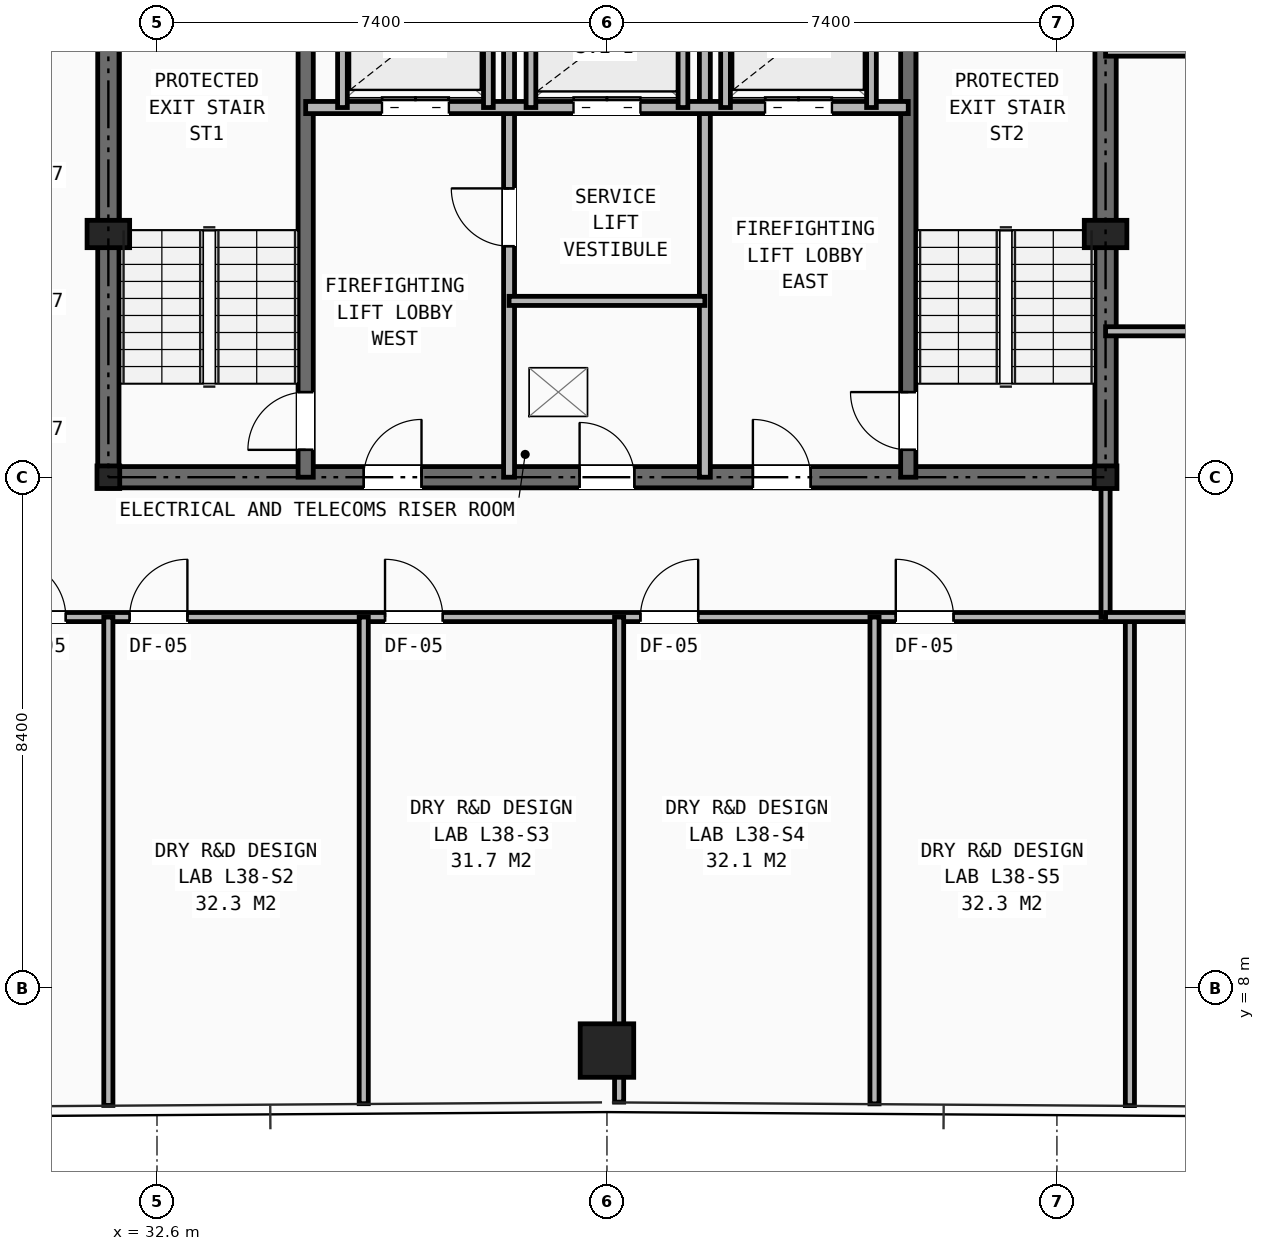
"""IFC4 building model, lengths in metres.
Left out: names, types, materials, properties, quantities, classifications, styles, units other than length and angle.
Written with IfcOpenShell. Run it as: python <this file> out.ifc"""

import sys

from ifc_helpers import new_model, si_unit, direction, frame, frame_2d, origin, origin_2d, place, context, subcontext, project, spatial, rectangle, hollow_rectangle, i_section, extrude, element, fill, save


model = new_model("IFC4")
c1 = context("Model", 3, precision=1e-05, world=origin(), true_north=direction((0.0, 1.0)))
c2 = subcontext(c1, "Body", "Model", "MODEL_VIEW")
j1 = project(units=[si_unit("LENGTHUNIT", "METRE"), si_unit("PLANEANGLEUNIT", "RADIAN")], contexts=[c1])
p1 = place(None, origin())
s1 = spatial("IfcSite", under=j1, at=p1, CompositionType="ELEMENT")
p2 = place(p1, origin())
s2 = spatial("IfcBuilding", under=s1, at=p2, CompositionType="ELEMENT")
p3 = place(p2, frame((0.0, 0.0, 133.25)))
s3 = spatial("IfcBuildingStorey", under=s2, at=p3, CompositionType="ELEMENT", Elevation=133.25)
for number, where, z_axis, x_axis in (
    (1, (31.8, 16.4, 0.0), (0.0, 0.0, 1.0), (1.0, 0.0, 0.0)),
    (2, (48.2, 16.4, 0.0), (0.0, 0.0, 1.0), (1.0, 0.0, 0.0)),
):
    element("IfcColumn", number, at=place(p3, frame(where, z_axis=z_axis, x_axis=x_axis)), inside=s3, PredefinedType="COLUMN", context=c2, shape_type="SweptSolid", body=[
        extrude(i_section(OverallWidth=0.374, OverallDepth=0.372, WebThickness=0.016, FlangeThickness=0.026, at=origin_2d()), origin(), (0.0, 0.0, 1.0), 3.45),
    ])
for number, where, z_axis, x_axis in (
    (3, (31.8, 20.4, 0.0), (0.0, 0.0, 1.0), (1.0, 0.0, 0.0)),
    (4, (48.2, 20.4, 0.0), (0.0, 0.0, 1.0), (1.0, 0.0, 0.0)),
):
    element("IfcColumn", number, at=place(p3, frame(where, z_axis=z_axis, x_axis=x_axis)), inside=s3, PredefinedType="PILASTER", context=c2, shape_type="SweptSolid", body=[
        extrude(rectangle(XDim=0.7, YDim=0.45, at=origin_2d()), origin(), (0.0, 0.0, 1.0), 3.45),
    ])
p4 = place(p3, frame((40.0, 6.97, 0.0), z_axis=(0.0, 0.0, 1.0), x_axis=(1.0, 0.0, 0.0)))
e5 = element("IfcColumn", 5, at=p4, inside=s3, PredefinedType="COLUMN", context=c2, shape_type="SweptSolid", body=[
    extrude(hollow_rectangle(XDim=0.88, YDim=0.88, WallThickness=0.06, at=origin_2d()), origin(), (0.0, 0.0, 1.0), 3.45),
])
p5 = place(p3, frame((31.8, 16.4, 0.0), z_axis=(0.0, 0.0, 1.0), x_axis=(1.0, 0.0, 0.0)))
e6 = element("IfcWall", 6, at=p5, inside=s3, PredefinedType="SHEAR", context=c2, shape_type="SweptSolid", body=[
    extrude(rectangle(XDim=16.4, YDim=0.35, at=frame_2d((8.2, 0.0))), origin(), (0.0, 0.0, 1.0), 3.21),
])
p6 = place(p5, frame((7.75, 0.0, 0.0)))
e7 = element("IfcOpeningElement", 7, at=p6, cuts=e6, PredefinedType="OPENING", context=c2, shape_type="SweptSolid", body=[
    extrude(rectangle(XDim=0.9, YDim=2.1, at=frame_2d((0.45, 1.05))), frame((0.0, 0.185, 0.0), z_axis=(0.0, -1.0, 0.0), x_axis=(1.0, 0.0, 0.0)), (0.0, 0.0, 1.0), 0.37),
])
p7 = place(p5, frame((4.2, 0.0, 0.0)))
e8 = element("IfcOpeningElement", 8, at=p7, cuts=e6, PredefinedType="OPENING", context=c2, shape_type="SweptSolid", body=[
    extrude(rectangle(XDim=0.95, YDim=2.1, at=frame_2d((0.475, 1.05))), frame((0.0, 0.185, 0.0), z_axis=(0.0, -1.0, 0.0), x_axis=(1.0, 0.0, 0.0)), (0.0, 0.0, 1.0), 0.37),
])
p8 = place(p5, frame((10.6, 0.0, 0.0)))
e9 = element("IfcOpeningElement", 9, at=p8, cuts=e6, PredefinedType="OPENING", context=c2, shape_type="SweptSolid", body=[
    extrude(rectangle(XDim=0.95, YDim=2.1, at=frame_2d((0.475, 1.05))), frame((0.0, 0.185, 0.0), z_axis=(0.0, -1.0, 0.0), x_axis=(1.0, 0.0, 0.0)), (0.0, 0.0, 1.0), 0.37),
])
p9 = place(p3, frame((31.8, 16.4, 0.0), z_axis=(0.0, 0.0, 1.0), x_axis=(0.0, 1.0, 0.0)))
e10 = element("IfcWall", 10, at=p9, inside=s3, PredefinedType="SHEAR", context=c2, shape_type="SweptSolid", body=[
    extrude(rectangle(XDim=14.8, YDim=0.35, at=frame_2d((7.4, 0.0))), origin(), (0.0, 0.0, 1.0), 3.21),
])
p10 = place(p9, frame((11.0, 0.0, 0.0)))
e11 = element("IfcOpeningElement", 11, at=p10, cuts=e10, PredefinedType="OPENING", context=c2, shape_type="SweptSolid", body=[
    extrude(rectangle(XDim=1.1, YDim=2.15, at=frame_2d((0.55, 1.075))), frame((0.0, 0.185, 0.0), z_axis=(0.0, -1.0, 0.0), x_axis=(1.0, 0.0, 0.0)), (0.0, 0.0, 1.0), 0.37),
])
p11 = place(p3, frame((48.2, 16.4, 0.0), z_axis=(0.0, 0.0, 1.0), x_axis=(0.0, 1.0, 0.0)))
e12 = element("IfcWall", 12, at=p11, inside=s3, PredefinedType="SHEAR", context=c2, shape_type="SweptSolid", body=[
    extrude(rectangle(XDim=14.8, YDim=0.35, at=frame_2d((7.4, 0.0))), origin(), (0.0, 0.0, 1.0), 3.21),
])
p12 = place(p11, frame((11.0, 0.0, 0.0)))
e13 = element("IfcOpeningElement", 13, at=p12, cuts=e12, PredefinedType="OPENING", context=c2, shape_type="SweptSolid", body=[
    extrude(rectangle(XDim=1.1, YDim=2.15, at=frame_2d((0.55, 1.075))), frame((0.0, 0.185, 0.0), z_axis=(0.0, -1.0, 0.0), x_axis=(1.0, 0.0, 0.0)), (0.0, 0.0, 1.0), 0.37),
])
p13 = place(p3, frame((35.045, 16.4, 0.0), z_axis=(0.0, 0.0, 1.0), x_axis=(0.0, 1.0, 0.0)))
e14 = element("IfcWall", 14, at=p13, inside=s3, PredefinedType="SHEAR", context=c2, shape_type="SweptSolid", body=[
    extrude(rectangle(XDim=8.4, YDim=0.25, at=frame_2d((4.2, 0.0))), origin(), (0.0, 0.0, 1.0), 3.21),
])
p14 = place(p13, frame((0.45, 0.0, 0.0)))
e15 = element("IfcOpeningElement", 15, at=p14, cuts=e14, PredefinedType="OPENING", context=c2, shape_type="SweptSolid", body=[
    extrude(rectangle(XDim=0.95, YDim=2.1, at=frame_2d((0.475, 1.05))), frame((0.0, 0.135, 0.0), z_axis=(0.0, -1.0, 0.0), x_axis=(1.0, 0.0, 0.0)), (0.0, 0.0, 1.0), 0.27),
])
p15 = place(p3, frame((44.955, 16.4, 0.0), z_axis=(0.0, 0.0, 1.0), x_axis=(0.0, 1.0, 0.0)))
e16 = element("IfcWall", 16, at=p15, inside=s3, PredefinedType="SHEAR", context=c2, shape_type="SweptSolid", body=[
    extrude(rectangle(XDim=8.4, YDim=0.25, at=frame_2d((4.2, 0.0))), origin(), (0.0, 0.0, 1.0), 3.21),
])
p16 = place(p15, frame((0.45, 0.0, 0.0)))
e17 = element("IfcOpeningElement", 17, at=p16, cuts=e16, PredefinedType="OPENING", context=c2, shape_type="SweptSolid", body=[
    extrude(rectangle(XDim=0.95, YDim=2.1, at=frame_2d((0.475, 1.05))), frame((0.0, 0.135, 0.0), z_axis=(0.0, -1.0, 0.0), x_axis=(1.0, 0.0, 0.0)), (0.0, 0.0, 1.0), 0.27),
])
p17 = place(p3, frame((38.39, 16.4, 0.0), z_axis=(0.0, 0.0, 1.0), x_axis=(0.0, 1.0, 0.0)))
e18 = element("IfcWall", 18, at=p17, inside=s3, PredefinedType="PARTITIONING", context=c2, shape_type="SweptSolid", body=[
    extrude(rectangle(XDim=8.4, YDim=0.18, at=frame_2d((4.2, 0.0))), origin(), (0.0, 0.0, 1.0), 2.661),
])
p18 = place(p17, frame((3.8, 0.0, 0.0)))
e19 = element("IfcOpeningElement", 19, at=p18, cuts=e18, PredefinedType="OPENING", context=c2, shape_type="SweptSolid", body=[
    extrude(rectangle(XDim=0.95, YDim=2.1, at=frame_2d((0.475, 1.05))), frame((0.0, 0.1, 0.0), z_axis=(0.0, -1.0, 0.0), x_axis=(1.0, 0.0, 0.0)), (0.0, 0.0, 1.0), 0.2),
])
p19 = place(p3, frame((41.61, 16.4, 0.0), z_axis=(0.0, 0.0, 1.0), x_axis=(0.0, 1.0, 0.0)))
e20 = element("IfcWall", 20, at=p19, inside=s3, PredefinedType="PARTITIONING", context=c2, shape_type="SweptSolid", body=[
    extrude(rectangle(XDim=8.4, YDim=0.18, at=frame_2d((4.2, 0.0))), origin(), (0.0, 0.0, 1.0), 2.661),
])
p20 = place(p3, frame((35.045, 22.48, 0.0), z_axis=(0.0, 0.0, 1.0), x_axis=(1.0, 0.0, 0.0)))
e21 = element("IfcWall", 21, at=p20, inside=s3, PredefinedType="SOLIDWALL", context=c2, shape_type="SweptSolid", body=[
    extrude(rectangle(XDim=9.91, YDim=0.2, at=frame_2d((4.955, 0.0))), origin(), (0.0, 0.0, 1.0), 3.21),
])
p21 = place(p20, frame((1.255, 0.0, 0.0)))
e22 = element("IfcOpeningElement", 22, at=p21, cuts=e21, PredefinedType="OPENING", context=c2, shape_type="SweptSolid", body=[
    extrude(rectangle(XDim=1.1, YDim=2.15, at=frame_2d((0.55, 1.075))), frame((0.0, 0.11, 0.0), z_axis=(0.0, -1.0, 0.0), x_axis=(1.0, 0.0, 0.0)), (0.0, 0.0, 1.0), 0.22),
])
p22 = place(p20, frame((7.555, 0.0, 0.0)))
e23 = element("IfcOpeningElement", 23, at=p22, cuts=e21, PredefinedType="OPENING", context=c2, shape_type="SweptSolid", body=[
    extrude(rectangle(XDim=1.1, YDim=2.15, at=frame_2d((0.55, 1.075))), frame((0.0, 0.11, 0.0), z_axis=(0.0, -1.0, 0.0), x_axis=(1.0, 0.0, 0.0)), (0.0, 0.0, 1.0), 0.22),
])
p23 = place(p20, frame((4.405, 0.0, 0.0)))
e24 = element("IfcOpeningElement", 24, at=p23, cuts=e21, PredefinedType="OPENING", context=c2, shape_type="SweptSolid", body=[
    extrude(rectangle(XDim=1.1, YDim=2.15, at=frame_2d((0.55, 1.075))), frame((0.0, 0.11, 0.0), z_axis=(0.0, -1.0, 0.0), x_axis=(1.0, 0.0, 0.0)), (0.0, 0.0, 1.0), 0.22),
])
p24 = place(p3, frame((38.39, 19.3, 0.0), z_axis=(0.0, 0.0, 1.0), x_axis=(1.0, 0.0, 0.0)))
e25 = element("IfcWall", 25, at=p24, inside=s3, PredefinedType="PARTITIONING", context=c2, shape_type="SweptSolid", body=[
    extrude(rectangle(XDim=3.22, YDim=0.15, at=frame_2d((1.61, 0.0))), origin(), (0.0, 0.0, 1.0), 3.21),
])
for number, where, z_axis, x_axis in (
    (26, (35.65, 22.48, 0.0), (0.0, 0.0, 1.0), (0.0, 1.0, 0.0)),
    (27, (38.05, 22.48, 0.0), (0.0, 0.0, 1.0), (0.0, 1.0, 0.0)),
    (28, (41.95, 22.48, 0.0), (0.0, 0.0, 1.0), (0.0, 1.0, 0.0)),
    (29, (44.35, 22.48, 0.0), (0.0, 0.0, 1.0), (0.0, 1.0, 0.0)),
    (30, (38.75, 22.48, 0.0), (0.0, 0.0, 1.0), (0.0, 1.0, 0.0)),
    (31, (41.25, 22.48, 0.0), (0.0, 0.0, 1.0), (0.0, 1.0, 0.0)),
):
    element("IfcWall", number, at=place(p3, frame(where, z_axis=z_axis, x_axis=x_axis)), inside=s3, PredefinedType="SOLIDWALL", context=c2, shape_type="SweptSolid", body=[
        extrude(rectangle(XDim=2.32, YDim=0.16, at=frame_2d((1.16, 0.0))), origin(), (0.0, 0.0, 1.0), 3.21),
    ])
p25 = place(p3, frame((29.6, 14.1, 0.0), z_axis=(0.0, 0.0, 1.0), x_axis=(1.0, 0.0, 0.0)))
e32 = element("IfcWall", 32, at=p25, inside=s3, PredefinedType="PARTITIONING", context=c2, shape_type="SweptSolid", body=[
    extrude(rectangle(XDim=18.6, YDim=0.15, at=frame_2d((9.3, 0.0))), origin(), (0.0, 0.0, 1.0), 2.252),
])
p26 = place(p25, frame((0.55, 0.0, 0.0)))
e33 = element("IfcOpeningElement", 33, at=p26, cuts=e32, PredefinedType="OPENING", context=c2, shape_type="SweptSolid", body=[
    extrude(rectangle(XDim=0.95, YDim=2.1, at=frame_2d((0.475, 1.05))), frame((0.0, 0.085, 0.0), z_axis=(0.0, -1.0, 0.0), x_axis=(1.0, 0.0, 0.0)), (0.0, 0.0, 1.0), 0.17),
])
p27 = place(p25, frame((2.55, 0.0, 0.0)))
e34 = element("IfcOpeningElement", 34, at=p27, cuts=e32, PredefinedType="OPENING", context=c2, shape_type="SweptSolid", body=[
    extrude(rectangle(XDim=0.95, YDim=2.1, at=frame_2d((0.475, 1.05))), frame((0.0, 0.085, 0.0), z_axis=(0.0, -1.0, 0.0), x_axis=(1.0, 0.0, 0.0)), (0.0, 0.0, 1.0), 0.17),
])
p28 = place(p25, frame((6.75, 0.0, 0.0)))
e35 = element("IfcOpeningElement", 35, at=p28, cuts=e32, PredefinedType="OPENING", context=c2, shape_type="SweptSolid", body=[
    extrude(rectangle(XDim=0.95, YDim=2.1, at=frame_2d((0.475, 1.05))), frame((0.0, 0.085, 0.0), z_axis=(0.0, -1.0, 0.0), x_axis=(1.0, 0.0, 0.0)), (0.0, 0.0, 1.0), 0.17),
])
p29 = place(p25, frame((10.95, 0.0, 0.0)))
e36 = element("IfcOpeningElement", 36, at=p29, cuts=e32, PredefinedType="OPENING", context=c2, shape_type="SweptSolid", body=[
    extrude(rectangle(XDim=0.95, YDim=2.1, at=frame_2d((0.475, 1.05))), frame((0.0, 0.085, 0.0), z_axis=(0.0, -1.0, 0.0), x_axis=(1.0, 0.0, 0.0)), (0.0, 0.0, 1.0), 0.17),
])
p30 = place(p25, frame((15.15, 0.0, 0.0)))
e37 = element("IfcOpeningElement", 37, at=p30, cuts=e32, PredefinedType="OPENING", context=c2, shape_type="SweptSolid", body=[
    extrude(rectangle(XDim=0.95, YDim=2.1, at=frame_2d((0.475, 1.05))), frame((0.0, 0.085, 0.0), z_axis=(0.0, -1.0, 0.0), x_axis=(1.0, 0.0, 0.0)), (0.0, 0.0, 1.0), 0.17),
])
p31 = place(p3, frame((48.2, 14.1, 0.0), z_axis=(0.0, 0.0, 1.0), x_axis=(0.0, 1.0, 0.0)))
e38 = element("IfcWall", 38, at=p31, inside=s3, PredefinedType="PARTITIONING", context=c2, shape_type="SweptSolid", body=[
    extrude(rectangle(XDim=2.3, YDim=0.15, at=frame_2d((1.15, 0.0))), origin(), (0.0, 0.0, 1.0), 2.661),
])
p32 = place(p3, frame((31.8, 6.068, 0.0), z_axis=(0.0, 0.0, 1.0), x_axis=(0.0, 1.0, 0.0)))
e39 = element("IfcWall", 39, at=p32, inside=s3, PredefinedType="PARTITIONING", context=c2, shape_type="SweptSolid", body=[
    extrude(rectangle(XDim=8.032, YDim=0.15, at=frame_2d((4.016, 0.0))), origin(), (0.0, 0.0, 1.0), 2.589),
])
p33 = place(p3, frame((36.0, 6.096, 0.0), z_axis=(0.0, 0.0, 1.0), x_axis=(0.0, 1.0, 0.0)))
e40 = element("IfcWall", 40, at=p33, inside=s3, PredefinedType="PARTITIONING", context=c2, shape_type="SweptSolid", body=[
    extrude(rectangle(XDim=8.004, YDim=0.15, at=frame_2d((4.002, 0.0))), origin(), (0.0, 0.0, 1.0), 2.252),
])
p34 = place(p3, frame((40.2, 6.122, 0.0), z_axis=(0.0, 0.0, 1.0), x_axis=(0.0, 1.0, 0.0)))
e41 = element("IfcWall", 41, at=p34, inside=s3, PredefinedType="PARTITIONING", context=c2, shape_type="SweptSolid", body=[
    extrude(rectangle(XDim=7.978, YDim=0.15, at=frame_2d((3.989, 0.0))), origin(), (0.0, 0.0, 1.0), 2.252),
])
p35 = place(p3, frame((44.4, 6.094, 0.0), z_axis=(0.0, 0.0, 1.0), x_axis=(0.0, 1.0, 0.0)))
e42 = element("IfcWall", 42, at=p35, inside=s3, PredefinedType="PARTITIONING", context=c2, shape_type="SweptSolid", body=[
    extrude(rectangle(XDim=8.007, YDim=0.15, at=frame_2d((4.003, 0.0))), origin(), (0.0, 0.0, 1.0), 2.589),
])
p36 = place(p3, frame((48.6, 6.065, 0.0), z_axis=(0.0, 0.0, 1.0), x_axis=(0.0, 1.0, 0.0)))
e43 = element("IfcWall", 43, at=p36, inside=s3, PredefinedType="PARTITIONING", context=c2, shape_type="SweptSolid", body=[
    extrude(rectangle(XDim=8.035, YDim=0.15, at=frame_2d((4.018, 0.0))), origin(), (0.0, 0.0, 1.0), 2.589),
])
p37 = place(p3, frame((48.2, 14.1, 0.0), z_axis=(0.0, 0.0, 1.0), x_axis=(1.0, 0.0, 0.0)))
e44 = element("IfcWall", 44, at=p37, inside=s3, PredefinedType="PARTITIONING", context=c2, shape_type="SweptSolid", body=[
    extrude(rectangle(XDim=18.678, YDim=0.15, at=frame_2d((9.339, 0.0))), origin(), (0.0, 0.0, 1.0), 2.589),
])
p38 = place(p3, frame((48.2, 18.8, 0.0), z_axis=(0.0, 0.0, 1.0), x_axis=(1.0, 0.0, 0.0)))
e45 = element("IfcWall", 45, at=p38, inside=s3, PredefinedType="PARTITIONING", context=c2, shape_type="SweptSolid", body=[
    extrude(rectangle(XDim=15.922, YDim=0.15, at=frame_2d((7.961, 0.0))), origin(), (0.0, 0.0, 1.0), 2.589),
])
p39 = place(p38, frame((1.4, 0.0, 0.0)))
e46 = element("IfcOpeningElement", 46, at=p39, cuts=e45, PredefinedType="OPENING", context=c2, shape_type="SweptSolid", body=[
    extrude(rectangle(XDim=0.95, YDim=2.1, at=frame_2d((0.475, 1.05))), frame((0.0, 0.085, 0.0), z_axis=(0.0, -1.0, 0.0), x_axis=(1.0, 0.0, 0.0)), (0.0, 0.0, 1.0), 0.17),
])
p40 = place(p3, frame((48.2, 23.4, 0.0), z_axis=(0.0, 0.0, 1.0), x_axis=(1.0, 0.0, 0.0)))
e47 = element("IfcWall", 47, at=p40, inside=s3, PredefinedType="PARTITIONING", context=c2, shape_type="SweptSolid", body=[
    extrude(rectangle(XDim=13.225, YDim=0.15, at=frame_2d((6.612, 0.0))), origin(), (0.0, 0.0, 1.0), 2.589),
])
p41 = place(p40, frame((1.4, 0.0, 0.0)))
e48 = element("IfcOpeningElement", 48, at=p41, cuts=e47, PredefinedType="OPENING", context=c2, shape_type="SweptSolid", body=[
    extrude(rectangle(XDim=0.95, YDim=2.1, at=frame_2d((0.475, 1.05))), frame((0.0, 0.085, 0.0), z_axis=(0.0, -1.0, 0.0), x_axis=(1.0, 0.0, 0.0)), (0.0, 0.0, 1.0), 0.17),
])
p42 = place(p6, origin())
e49 = element("IfcDoor", 49, at=p42, inside=s3, OperationType="SINGLE_SWING_LEFT", PredefinedType="DOOR", context=c2, shape_type="SweptSolid", body=[
    extrude(rectangle(XDim=0.9, YDim=2.1, at=frame_2d((0.45, 1.05))), frame((0.0, 0.025, 0.0), z_axis=(0.0, -1.0, 0.0), x_axis=(1.0, 0.0, 0.0)), (0.0, 0.0, 1.0), 0.05),
])
fill(e7, e49)
p43 = place(p18, origin())
e50 = element("IfcDoor", 50, at=p43, inside=s3, OperationType="SINGLE_SWING_RIGHT", PredefinedType="DOOR", context=c2, shape_type="SweptSolid", body=[
    extrude(rectangle(XDim=0.95, YDim=2.1, at=frame_2d((0.475, 1.05))), frame((0.0, 0.025, 0.0), z_axis=(0.0, -1.0, 0.0), x_axis=(1.0, 0.0, 0.0)), (0.0, 0.0, 1.0), 0.05),
])
fill(e19, e50)
p44 = place(p14, origin())
e51 = element("IfcDoor", 51, at=p44, inside=s3, OperationType="SINGLE_SWING_LEFT", PredefinedType="DOOR", context=c2, shape_type="SweptSolid", body=[
    extrude(rectangle(XDim=0.95, YDim=2.1, at=frame_2d((0.475, 1.05))), frame((0.0, 0.025, 0.0), z_axis=(0.0, -1.0, 0.0), x_axis=(1.0, 0.0, 0.0)), (0.0, 0.0, 1.0), 0.05),
])
fill(e15, e51)
p45 = place(p16, origin())
e52 = element("IfcDoor", 52, at=p45, inside=s3, OperationType="SINGLE_SWING_RIGHT", PredefinedType="DOOR", context=c2, shape_type="SweptSolid", body=[
    extrude(rectangle(XDim=0.95, YDim=2.1, at=frame_2d((0.475, 1.05))), frame((0.0, 0.025, 0.0), z_axis=(0.0, -1.0, 0.0), x_axis=(1.0, 0.0, 0.0)), (0.0, 0.0, 1.0), 0.05),
])
fill(e17, e52)
p46 = place(p7, origin())
e53 = element("IfcDoor", 53, at=p46, inside=s3, OperationType="SINGLE_SWING_RIGHT", PredefinedType="DOOR", context=c2, shape_type="SweptSolid", body=[
    extrude(rectangle(XDim=0.95, YDim=2.1, at=frame_2d((0.475, 1.05))), frame((0.0, 0.025, 0.0), z_axis=(0.0, -1.0, 0.0), x_axis=(1.0, 0.0, 0.0)), (0.0, 0.0, 1.0), 0.05),
])
fill(e8, e53)
p47 = place(p8, origin())
e54 = element("IfcDoor", 54, at=p47, inside=s3, OperationType="SINGLE_SWING_LEFT", PredefinedType="DOOR", context=c2, shape_type="SweptSolid", body=[
    extrude(rectangle(XDim=0.95, YDim=2.1, at=frame_2d((0.475, 1.05))), frame((0.0, 0.025, 0.0), z_axis=(0.0, -1.0, 0.0), x_axis=(1.0, 0.0, 0.0)), (0.0, 0.0, 1.0), 0.05),
])
fill(e9, e54)
p48 = place(p21, origin())
e55 = element("IfcDoor", 55, at=p48, inside=s3, OperationType="DOUBLE_DOOR_SLIDING", PredefinedType="DOOR", context=c2, shape_type="SweptSolid", body=[
    extrude(rectangle(XDim=1.1, YDim=2.15, at=frame_2d((0.55, 1.075))), frame((0.0, 0.025, 0.0), z_axis=(0.0, -1.0, 0.0), x_axis=(1.0, 0.0, 0.0)), (0.0, 0.0, 1.0), 0.05),
])
fill(e22, e55)
p49 = place(p22, origin())
e56 = element("IfcDoor", 56, at=p49, inside=s3, OperationType="DOUBLE_DOOR_SLIDING", PredefinedType="DOOR", context=c2, shape_type="SweptSolid", body=[
    extrude(rectangle(XDim=1.1, YDim=2.15, at=frame_2d((0.55, 1.075))), frame((0.0, 0.025, 0.0), z_axis=(0.0, -1.0, 0.0), x_axis=(1.0, 0.0, 0.0)), (0.0, 0.0, 1.0), 0.05),
])
fill(e23, e56)
p50 = place(p23, origin())
e57 = element("IfcDoor", 57, at=p50, inside=s3, OperationType="DOUBLE_DOOR_SLIDING", PredefinedType="DOOR", context=c2, shape_type="SweptSolid", body=[
    extrude(rectangle(XDim=1.1, YDim=2.15, at=frame_2d((0.55, 1.075))), frame((0.0, 0.025, 0.0), z_axis=(0.0, -1.0, 0.0), x_axis=(1.0, 0.0, 0.0)), (0.0, 0.0, 1.0), 0.05),
])
fill(e24, e57)
p51 = place(p26, origin())
e58 = element("IfcDoor", 58, at=p51, inside=s3, OperationType="SINGLE_SWING_LEFT", PredefinedType="DOOR", context=c2, shape_type="SweptSolid", body=[
    extrude(rectangle(XDim=0.95, YDim=2.1, at=frame_2d((0.475, 1.05))), frame((0.0, 0.025, 0.0), z_axis=(0.0, -1.0, 0.0), x_axis=(1.0, 0.0, 0.0)), (0.0, 0.0, 1.0), 0.05),
])
fill(e33, e58)
p52 = place(p27, origin())
e59 = element("IfcDoor", 59, at=p52, inside=s3, OperationType="SINGLE_SWING_RIGHT", PredefinedType="DOOR", context=c2, shape_type="SweptSolid", body=[
    extrude(rectangle(XDim=0.95, YDim=2.1, at=frame_2d((0.475, 1.05))), frame((0.0, 0.025, 0.0), z_axis=(0.0, -1.0, 0.0), x_axis=(1.0, 0.0, 0.0)), (0.0, 0.0, 1.0), 0.05),
])
fill(e34, e59)
p53 = place(p28, origin())
e60 = element("IfcDoor", 60, at=p53, inside=s3, OperationType="SINGLE_SWING_LEFT", PredefinedType="DOOR", context=c2, shape_type="SweptSolid", body=[
    extrude(rectangle(XDim=0.95, YDim=2.1, at=frame_2d((0.475, 1.05))), frame((0.0, 0.025, 0.0), z_axis=(0.0, -1.0, 0.0), x_axis=(1.0, 0.0, 0.0)), (0.0, 0.0, 1.0), 0.05),
])
fill(e35, e60)
p54 = place(p29, origin())
e61 = element("IfcDoor", 61, at=p54, inside=s3, OperationType="SINGLE_SWING_RIGHT", PredefinedType="DOOR", context=c2, shape_type="SweptSolid", body=[
    extrude(rectangle(XDim=0.95, YDim=2.1, at=frame_2d((0.475, 1.05))), frame((0.0, 0.025, 0.0), z_axis=(0.0, -1.0, 0.0), x_axis=(1.0, 0.0, 0.0)), (0.0, 0.0, 1.0), 0.05),
])
fill(e36, e61)
p55 = place(p30, origin())
e62 = element("IfcDoor", 62, at=p55, inside=s3, OperationType="SINGLE_SWING_LEFT", PredefinedType="DOOR", context=c2, shape_type="SweptSolid", body=[
    extrude(rectangle(XDim=0.95, YDim=2.1, at=frame_2d((0.475, 1.05))), frame((0.0, 0.025, 0.0), z_axis=(0.0, -1.0, 0.0), x_axis=(1.0, 0.0, 0.0)), (0.0, 0.0, 1.0), 0.05),
])
fill(e37, e62)
save(model, sys.argv[1])
